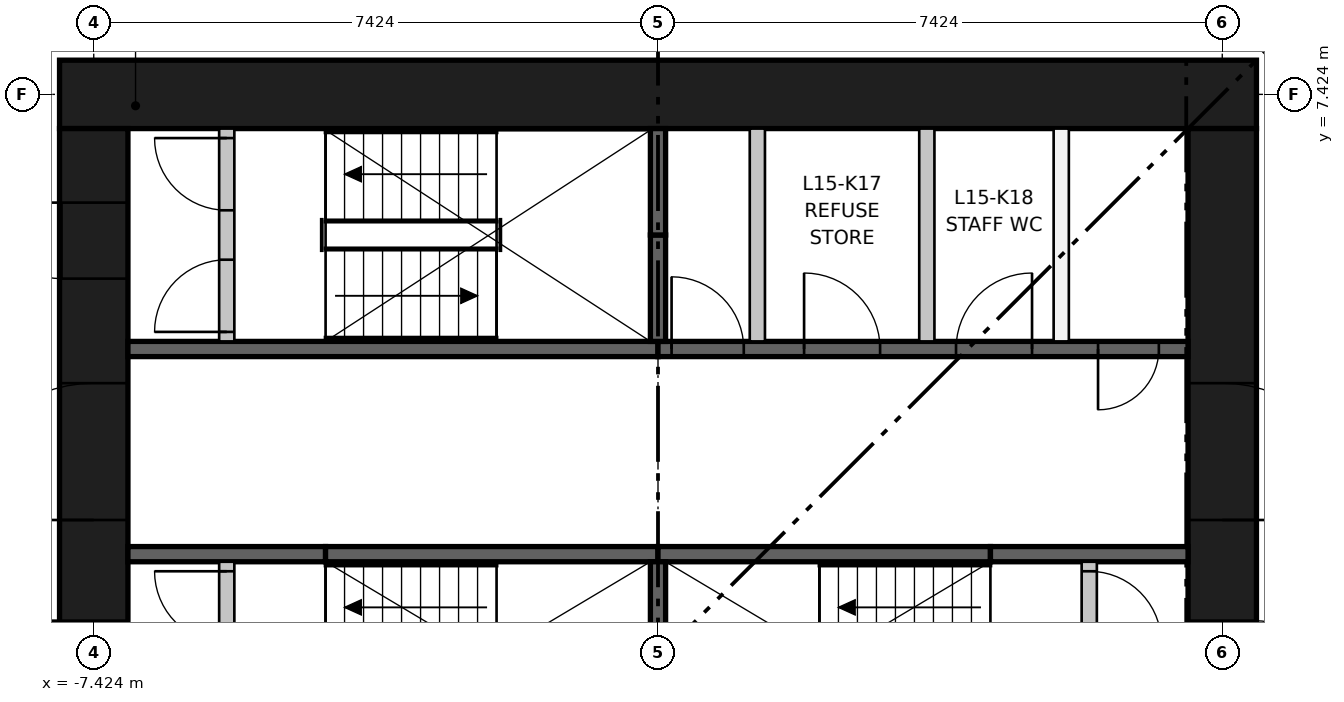
"""IFC4 building model, lengths in metres.
Left out: names, types, materials, properties, quantities, classifications, styles, units other than length and angle.
Written with IfcOpenShell. Run it as: python <this file> out.ifc"""

import sys

from ifc_helpers import new_model, si_unit, direction, frame, frame_2d, origin, place, context, subcontext, project, spatial, rectangle, extrude, element, fill, save


model = new_model("IFC4")
c1 = context("Model", 3, precision=1e-05, world=origin(), true_north=direction((0.0, 1.0)))
c2 = subcontext(c1, "Body", "Model", "MODEL_VIEW")
j1 = project(units=[si_unit("LENGTHUNIT", "METRE"), si_unit("PLANEANGLEUNIT", "RADIAN")], contexts=[c1])
p1 = place(None, origin())
s1 = spatial("IfcSite", under=j1, at=p1, CompositionType="ELEMENT")
p2 = place(p1, origin())
s2 = spatial("IfcBuilding", under=s1, at=p2, CompositionType="ELEMENT")
p3 = place(p2, frame((0.0, 0.0, 59.05)))
s3 = spatial("IfcBuildingStorey", under=s2, at=p3, CompositionType="ELEMENT", Elevation=59.05)
p4 = place(p3, frame((-7.874, 7.424, 0.0), z_axis=(0.0, 0.0, 1.0), x_axis=(1.0, 0.0, 0.0)))
e1 = element("IfcWall", 1, at=p4, inside=s3, PredefinedType="SHEAR", context=c2, shape_type="SweptSolid", body=[
    extrude(rectangle(XDim=15.748, YDim=0.9, at=frame_2d((7.874, 0.0))), origin(), (0.0, 0.0, 1.0), 3.65),
])
p5 = place(p3, frame((-7.424, -6.974, 0.0), z_axis=(0.0, 0.0, 1.0), x_axis=(0.0, 1.0, 0.0)))
e2 = element("IfcWall", 2, at=p5, inside=s3, PredefinedType="SHEAR", context=c2, shape_type="SweptSolid", body=[
    extrude(rectangle(XDim=13.948, YDim=0.9, at=frame_2d((6.974, 0.0))), origin(), (0.0, 0.0, 1.0), 3.65),
])
p6 = place(p5, frame((6.474, 0.0, 0.0)))
e3 = element("IfcOpeningElement", 3, at=p6, cuts=e2, PredefinedType="OPENING", context=c2, shape_type="SweptSolid", body=[
    extrude(rectangle(XDim=1.0, YDim=2.1, at=frame_2d((0.5, 1.05))), frame((0.0, 0.46, 0.0), z_axis=(0.0, -1.0, 0.0), x_axis=(1.0, 0.0, 0.0)), (0.0, 0.0, 1.0), 0.92),
])
p7 = place(p5, frame((3.35, 0.0, 0.0)))
e4 = element("IfcOpeningElement", 4, at=p7, cuts=e2, PredefinedType="OPENING", context=c2, shape_type="SweptSolid", body=[
    extrude(rectangle(XDim=1.8, YDim=2.1, at=frame_2d((0.9, 1.05))), frame((0.0, 0.46, 0.0), z_axis=(0.0, -1.0, 0.0), x_axis=(1.0, 0.0, 0.0)), (0.0, 0.0, 1.0), 0.92),
])
p8 = place(p5, frame((8.799, 0.0, 0.0)))
e5 = element("IfcOpeningElement", 5, at=p8, cuts=e2, PredefinedType="OPENING", context=c2, shape_type="SweptSolid", body=[
    extrude(rectangle(XDim=1.8, YDim=2.1, at=frame_2d((0.9, 1.05))), frame((0.0, 0.46, 0.0), z_axis=(0.0, -1.0, 0.0), x_axis=(1.0, 0.0, 0.0)), (0.0, 0.0, 1.0), 0.92),
])
p9 = place(p5, frame((11.974, 0.0, 0.0)))
e6 = element("IfcOpeningElement", 6, at=p9, cuts=e2, PredefinedType="OPENING", context=c2, shape_type="SweptSolid", body=[
    extrude(rectangle(XDim=1.0, YDim=2.1, at=frame_2d((0.5, 1.05))), frame((0.0, 0.46, 0.0), z_axis=(0.0, -1.0, 0.0), x_axis=(1.0, 0.0, 0.0)), (0.0, 0.0, 1.0), 0.92),
])
p10 = place(p3, frame((7.424, -6.974, 0.0), z_axis=(0.0, 0.0, 1.0), x_axis=(0.0, 1.0, 0.0)))
e7 = element("IfcWall", 7, at=p10, inside=s3, PredefinedType="SHEAR", context=c2, shape_type="SweptSolid", body=[
    extrude(rectangle(XDim=13.948, YDim=0.9, at=frame_2d((6.974, 0.0))), origin(), (0.0, 0.0, 1.0), 3.65),
])
p11 = place(p10, frame((6.474, 0.0, 0.0)))
e8 = element("IfcOpeningElement", 8, at=p11, cuts=e7, PredefinedType="OPENING", context=c2, shape_type="SweptSolid", body=[
    extrude(rectangle(XDim=1.0, YDim=2.1, at=frame_2d((0.5, 1.05))), frame((0.0, 0.46, 0.0), z_axis=(0.0, -1.0, 0.0), x_axis=(1.0, 0.0, 0.0)), (0.0, 0.0, 1.0), 0.92),
])
p12 = place(p10, frame((3.35, 0.0, 0.0)))
e9 = element("IfcOpeningElement", 9, at=p12, cuts=e7, PredefinedType="OPENING", context=c2, shape_type="SweptSolid", body=[
    extrude(rectangle(XDim=1.8, YDim=2.1, at=frame_2d((0.9, 1.05))), frame((0.0, 0.46, 0.0), z_axis=(0.0, -1.0, 0.0), x_axis=(1.0, 0.0, 0.0)), (0.0, 0.0, 1.0), 0.92),
])
p13 = place(p10, frame((8.799, 0.0, 0.0)))
e10 = element("IfcOpeningElement", 10, at=p13, cuts=e7, PredefinedType="OPENING", context=c2, shape_type="SweptSolid", body=[
    extrude(rectangle(XDim=1.8, YDim=2.1, at=frame_2d((0.9, 1.05))), frame((0.0, 0.46, 0.0), z_axis=(0.0, -1.0, 0.0), x_axis=(1.0, 0.0, 0.0)), (0.0, 0.0, 1.0), 0.92),
])
p14 = place(p3, frame((-6.974, 4.074, 0.0), z_axis=(0.0, 0.0, 1.0), x_axis=(1.0, 0.0, 0.0)))
e11 = element("IfcWall", 11, at=p14, inside=s3, PredefinedType="SHEAR", context=c2, shape_type="SweptSolid", body=[
    extrude(rectangle(XDim=6.974, YDim=0.2, at=frame_2d((3.487, 0.0))), origin(), (0.0, 0.0, 1.0), 3.3),
])
p15 = place(p3, frame((0.0, 4.074, 0.0), z_axis=(0.0, 0.0, 1.0), x_axis=(1.0, 0.0, 0.0)))
e12 = element("IfcWall", 12, at=p15, inside=s3, PredefinedType="SHEAR", context=c2, shape_type="SweptSolid", body=[
    extrude(rectangle(XDim=6.974, YDim=0.2, at=frame_2d((3.487, 0.0))), origin(), (0.0, 0.0, 1.0), 3.3),
])
p16 = place(p15, frame((0.179, 0.0, 0.0)))
e13 = element("IfcOpeningElement", 13, at=p16, cuts=e12, PredefinedType="OPENING", context=c2, shape_type="SweptSolid", body=[
    extrude(rectangle(XDim=0.95, YDim=2.1, at=frame_2d((0.475, 1.05))), frame((0.0, 0.11, 0.0), z_axis=(0.0, -1.0, 0.0), x_axis=(1.0, 0.0, 0.0)), (0.0, 0.0, 1.0), 0.22),
])
p17 = place(p15, frame((1.922, 0.0, 0.0)))
e14 = element("IfcOpeningElement", 14, at=p17, cuts=e12, PredefinedType="OPENING", context=c2, shape_type="SweptSolid", body=[
    extrude(rectangle(XDim=1.0, YDim=2.1, at=frame_2d((0.5, 1.05))), frame((0.0, 0.11, 0.0), z_axis=(0.0, -1.0, 0.0), x_axis=(1.0, 0.0, 0.0)), (0.0, 0.0, 1.0), 0.22),
])
p18 = place(p15, frame((3.921, 0.0, 0.0)))
e15 = element("IfcOpeningElement", 15, at=p18, cuts=e12, PredefinedType="OPENING", context=c2, shape_type="SweptSolid", body=[
    extrude(rectangle(XDim=1.0, YDim=2.1, at=frame_2d((0.5, 1.05))), frame((0.0, 0.11, 0.0), z_axis=(0.0, -1.0, 0.0), x_axis=(1.0, 0.0, 0.0)), (0.0, 0.0, 1.0), 0.22),
])
p19 = place(p15, frame((5.79, 0.0, 0.0)))
e16 = element("IfcOpeningElement", 16, at=p19, cuts=e12, PredefinedType="OPENING", context=c2, shape_type="SweptSolid", body=[
    extrude(rectangle(XDim=0.8, YDim=2.1, at=frame_2d((0.4, 1.05))), frame((0.0, 0.11, 0.0), z_axis=(0.0, -1.0, 0.0), x_axis=(1.0, 0.0, 0.0)), (0.0, 0.0, 1.0), 0.22),
])
p20 = place(p3, frame((-6.974, 1.375, 0.0), z_axis=(0.0, 0.0, 1.0), x_axis=(1.0, 0.0, 0.0)))
e17 = element("IfcWall", 17, at=p20, inside=s3, PredefinedType="SHEAR", context=c2, shape_type="SweptSolid", body=[
    extrude(rectangle(XDim=2.6, YDim=0.2, at=frame_2d((1.3, 0.0))), origin(), (0.0, 0.0, 1.0), 3.3),
])
for number, where, z_axis, x_axis in (
    (18, (-4.374, 1.375, 0.0), (0.0, 0.0, 1.0), (1.0, 0.0, 0.0)),
    (19, (0.0, 1.375, 0.0), (0.0, 0.0, 1.0), (1.0, 0.0, 0.0)),
):
    element("IfcWall", number, at=place(p3, frame(where, z_axis=z_axis, x_axis=x_axis)), inside=s3, PredefinedType="SHEAR", context=c2, shape_type="SweptSolid", body=[
        extrude(rectangle(XDim=4.374, YDim=0.2, at=frame_2d((2.187, 0.0))), origin(), (0.0, 0.0, 1.0), 3.3),
    ])
p21 = place(p3, frame((4.374, 1.375, 0.0), z_axis=(0.0, 0.0, 1.0), x_axis=(1.0, 0.0, 0.0)))
e20 = element("IfcWall", 20, at=p21, inside=s3, PredefinedType="SHEAR", context=c2, shape_type="SweptSolid", body=[
    extrude(rectangle(XDim=2.6, YDim=0.2, at=frame_2d((1.3, 0.0))), origin(), (0.0, 0.0, 1.0), 3.3),
])
p22 = place(p3, frame((0.0, -1.275, 0.0), z_axis=(0.0, 0.0, 1.0), x_axis=(0.0, 1.0, 0.0)))
e21 = element("IfcWall", 21, at=p22, inside=s3, PredefinedType="SHEAR", context=c2, shape_type="SweptSolid", body=[
    extrude(rectangle(XDim=2.55, YDim=0.2, at=frame_2d((1.275, 0.0))), origin(), (0.0, 0.0, 1.0), 3.3),
])
p23 = place(p3, frame((0.0, 4.174, 0.0), z_axis=(0.0, 0.0, 1.0), x_axis=(0.0, 1.0, 0.0)))
e22 = element("IfcWall", 22, at=p23, inside=s3, PredefinedType="SHEAR", context=c2, shape_type="SweptSolid", body=[
    extrude(rectangle(XDim=1.4, YDim=0.2, at=frame_2d((0.7, 0.0))), origin(), (0.0, 0.0, 1.0), 3.3),
])
p24 = place(p3, frame((0.0, 5.574, 0.0), z_axis=(0.0, 0.0, 1.0), x_axis=(0.0, 1.0, 0.0)))
e23 = element("IfcWall", 23, at=p24, inside=s3, PredefinedType="SHEAR", context=c2, shape_type="SweptSolid", body=[
    extrude(rectangle(XDim=1.4, YDim=0.2, at=frame_2d((0.7, 0.0))), origin(), (0.0, 0.0, 1.0), 3.3),
])
for number, where, z_axis, x_axis in (
    (24, (1.307, 4.174, 0.0), (0.0, 0.0, 1.0), (0.0, 1.0, 0.0)),
    (25, (3.537, 4.174, 0.0), (0.0, 0.0, 1.0), (0.0, 1.0, 0.0)),
    (26, (5.305, 4.174, 0.0), (0.0, 0.0, 1.0), (0.0, 1.0, 0.0)),
):
    element("IfcWall", number, at=place(p3, frame(where, z_axis=z_axis, x_axis=x_axis)), inside=s3, PredefinedType="PARTITIONING", context=c2, shape_type="SweptSolid", body=[
        extrude(rectangle(XDim=2.8, YDim=0.2, at=frame_2d((1.4, 0.0))), origin(), (0.0, 0.0, 1.0), 3.3),
    ])
p25 = place(p3, frame((-5.674, -1.275, 0.0), z_axis=(0.0, 0.0, 1.0), x_axis=(0.0, 1.0, 0.0)))
e27 = element("IfcWall", 27, at=p25, inside=s3, PredefinedType="PARTITIONING", context=c2, shape_type="SweptSolid", body=[
    extrude(rectangle(XDim=2.55, YDim=0.2, at=frame_2d((1.275, 0.0))), origin(), (0.0, 0.0, 1.0), 3.3),
])
p26 = place(p25, frame((0.125, 0.0, 0.0)))
e28 = element("IfcOpeningElement", 28, at=p26, cuts=e27, PredefinedType="OPENING", context=c2, shape_type="SweptSolid", body=[
    extrude(rectangle(XDim=0.95, YDim=2.1, at=frame_2d((0.475, 1.05))), frame((0.0, 0.11, 0.0), z_axis=(0.0, -1.0, 0.0), x_axis=(1.0, 0.0, 0.0)), (0.0, 0.0, 1.0), 0.22),
])
p27 = place(p25, frame((1.475, 0.0, 0.0)))
e29 = element("IfcOpeningElement", 29, at=p27, cuts=e27, PredefinedType="OPENING", context=c2, shape_type="SweptSolid", body=[
    extrude(rectangle(XDim=0.95, YDim=2.1, at=frame_2d((0.475, 1.05))), frame((0.0, 0.11, 0.0), z_axis=(0.0, -1.0, 0.0), x_axis=(1.0, 0.0, 0.0)), (0.0, 0.0, 1.0), 0.22),
])
p28 = place(p3, frame((5.674, -1.275, 0.0), z_axis=(0.0, 0.0, 1.0), x_axis=(0.0, 1.0, 0.0)))
e30 = element("IfcWall", 30, at=p28, inside=s3, PredefinedType="PARTITIONING", context=c2, shape_type="SweptSolid", body=[
    extrude(rectangle(XDim=2.55, YDim=0.2, at=frame_2d((1.275, 0.0))), origin(), (0.0, 0.0, 1.0), 3.3),
])
p29 = place(p28, frame((0.125, 0.0, 0.0)))
e31 = element("IfcOpeningElement", 31, at=p29, cuts=e30, PredefinedType="OPENING", context=c2, shape_type="SweptSolid", body=[
    extrude(rectangle(XDim=0.95, YDim=2.1, at=frame_2d((0.475, 1.05))), frame((0.0, 0.11, 0.0), z_axis=(0.0, -1.0, 0.0), x_axis=(1.0, 0.0, 0.0)), (0.0, 0.0, 1.0), 0.22),
])
p30 = place(p28, frame((1.475, 0.0, 0.0)))
e32 = element("IfcOpeningElement", 32, at=p30, cuts=e30, PredefinedType="OPENING", context=c2, shape_type="SweptSolid", body=[
    extrude(rectangle(XDim=0.95, YDim=2.1, at=frame_2d((0.475, 1.05))), frame((0.0, 0.11, 0.0), z_axis=(0.0, -1.0, 0.0), x_axis=(1.0, 0.0, 0.0)), (0.0, 0.0, 1.0), 0.22),
])
p31 = place(p3, frame((-5.674, 4.174, 0.0), z_axis=(0.0, 0.0, 1.0), x_axis=(0.0, 1.0, 0.0)))
e33 = element("IfcWall", 33, at=p31, inside=s3, PredefinedType="PARTITIONING", context=c2, shape_type="SweptSolid", body=[
    extrude(rectangle(XDim=2.8, YDim=0.2, at=frame_2d((1.4, 0.0))), origin(), (0.0, 0.0, 1.0), 3.3),
])
p32 = place(p31, frame((0.125, 0.0, 0.0)))
e34 = element("IfcOpeningElement", 34, at=p32, cuts=e33, PredefinedType="OPENING", context=c2, shape_type="SweptSolid", body=[
    extrude(rectangle(XDim=0.95, YDim=2.1, at=frame_2d((0.475, 1.05))), frame((0.0, 0.11, 0.0), z_axis=(0.0, -1.0, 0.0), x_axis=(1.0, 0.0, 0.0)), (0.0, 0.0, 1.0), 0.22),
])
p33 = place(p31, frame((1.725, 0.0, 0.0)))
e35 = element("IfcOpeningElement", 35, at=p33, cuts=e33, PredefinedType="OPENING", context=c2, shape_type="SweptSolid", body=[
    extrude(rectangle(XDim=0.95, YDim=2.1, at=frame_2d((0.475, 1.05))), frame((0.0, 0.11, 0.0), z_axis=(0.0, -1.0, 0.0), x_axis=(1.0, 0.0, 0.0)), (0.0, 0.0, 1.0), 0.22),
])
p34 = place(p27, origin())
e36 = element("IfcDoor", 36, at=p34, inside=s3, OperationType="SINGLE_SWING_RIGHT", PredefinedType="DOOR", context=c2, shape_type="SweptSolid", body=[
    extrude(rectangle(XDim=0.95, YDim=2.1, at=frame_2d((0.475, 1.05))), frame((0.0, 0.025, 0.0), z_axis=(0.0, -1.0, 0.0), x_axis=(1.0, 0.0, 0.0)), (0.0, 0.0, 1.0), 0.05),
])
fill(e29, e36)
p35 = place(p30, frame((0.95, 0.0, 0.0), z_axis=(0.0, 0.0, 1.0), x_axis=(-1.0, 0.0, 0.0)))
e37 = element("IfcDoor", 37, at=p35, inside=s3, OperationType="SINGLE_SWING_LEFT", PredefinedType="DOOR", context=c2, shape_type="SweptSolid", body=[
    extrude(rectangle(XDim=0.95, YDim=2.1, at=frame_2d((0.475, 1.05))), frame((0.0, 0.025, 0.0), z_axis=(0.0, -1.0, 0.0), x_axis=(1.0, 0.0, 0.0)), (0.0, 0.0, 1.0), 0.05),
])
fill(e32, e37)
p36 = place(p32, origin())
e38 = element("IfcDoor", 38, at=p36, inside=s3, OperationType="SINGLE_SWING_LEFT", PredefinedType="DOOR", context=c2, shape_type="SweptSolid", body=[
    extrude(rectangle(XDim=0.95, YDim=2.1, at=frame_2d((0.475, 1.05))), frame((0.0, 0.025, 0.0), z_axis=(0.0, -1.0, 0.0), x_axis=(1.0, 0.0, 0.0)), (0.0, 0.0, 1.0), 0.05),
])
fill(e34, e38)
p37 = place(p33, origin())
e39 = element("IfcDoor", 39, at=p37, inside=s3, OperationType="SINGLE_SWING_RIGHT", PredefinedType="DOOR", context=c2, shape_type="SweptSolid", body=[
    extrude(rectangle(XDim=0.95, YDim=2.1, at=frame_2d((0.475, 1.05))), frame((0.0, 0.025, 0.0), z_axis=(0.0, -1.0, 0.0), x_axis=(1.0, 0.0, 0.0)), (0.0, 0.0, 1.0), 0.05),
])
fill(e35, e39)
p38 = place(p16, origin())
e40 = element("IfcDoor", 40, at=p38, inside=s3, OperationType="SINGLE_SWING_LEFT", PredefinedType="DOOR", context=c2, shape_type="SweptSolid", body=[
    extrude(rectangle(XDim=0.95, YDim=2.1, at=frame_2d((0.475, 1.05))), frame((0.0, 0.025, 0.0), z_axis=(0.0, -1.0, 0.0), x_axis=(1.0, 0.0, 0.0)), (0.0, 0.0, 1.0), 0.05),
])
fill(e13, e40)
p39 = place(p17, origin())
e41 = element("IfcDoor", 41, at=p39, inside=s3, OperationType="SINGLE_SWING_LEFT", PredefinedType="DOOR", context=c2, shape_type="SweptSolid", body=[
    extrude(rectangle(XDim=1.0, YDim=2.1, at=frame_2d((0.5, 1.05))), frame((0.0, 0.025, 0.0), z_axis=(0.0, -1.0, 0.0), x_axis=(1.0, 0.0, 0.0)), (0.0, 0.0, 1.0), 0.05),
])
fill(e14, e41)
p40 = place(p18, origin())
e42 = element("IfcDoor", 42, at=p40, inside=s3, OperationType="SINGLE_SWING_RIGHT", PredefinedType="DOOR", context=c2, shape_type="SweptSolid", body=[
    extrude(rectangle(XDim=1.0, YDim=2.1, at=frame_2d((0.5, 1.05))), frame((0.0, 0.025, 0.0), z_axis=(0.0, -1.0, 0.0), x_axis=(1.0, 0.0, 0.0)), (0.0, 0.0, 1.0), 0.05),
])
fill(e15, e42)
p41 = place(p19, frame((0.8, 0.0, 0.0), z_axis=(0.0, 0.0, 1.0), x_axis=(-1.0, 0.0, 0.0)))
e43 = element("IfcDoor", 43, at=p41, inside=s3, OperationType="SINGLE_SWING_LEFT", PredefinedType="DOOR", context=c2, shape_type="SweptSolid", body=[
    extrude(rectangle(XDim=0.8, YDim=2.1, at=frame_2d((0.4, 1.05))), frame((0.0, 0.025, 0.0), z_axis=(0.0, -1.0, 0.0), x_axis=(1.0, 0.0, 0.0)), (0.0, 0.0, 1.0), 0.05),
])
fill(e16, e43)
p42 = place(p6, origin())
e44 = element("IfcDoor", 44, at=p42, inside=s3, OperationType="SINGLE_SWING_RIGHT", PredefinedType="DOOR", context=c2, shape_type="SweptSolid", body=[
    extrude(rectangle(XDim=1.0, YDim=2.1, at=frame_2d((0.5, 1.05))), frame((0.0, 0.45, 0.0), z_axis=(0.0, -1.0, 0.0), x_axis=(1.0, 0.0, 0.0)), (0.0, 0.0, 1.0), 0.05),
])
fill(e3, e44)
p43 = place(p8, origin())
e45 = element("IfcDoor", 45, at=p43, inside=s3, OperationType="DOUBLE_DOOR_SINGLE_SWING", PredefinedType="DOOR", context=c2, shape_type="SweptSolid", body=[
    extrude(rectangle(XDim=1.8, YDim=2.1, at=frame_2d((0.9, 1.05))), frame((0.0, 0.025, 0.0), z_axis=(0.0, -1.0, 0.0), x_axis=(1.0, 0.0, 0.0)), (0.0, 0.0, 1.0), 0.05),
])
fill(e5, e45)
p44 = place(p9, origin())
e46 = element("IfcDoor", 46, at=p44, inside=s3, OperationType="SINGLE_SWING_RIGHT", PredefinedType="DOOR", context=c2, shape_type="SweptSolid", body=[
    extrude(rectangle(XDim=1.0, YDim=2.1, at=frame_2d((0.5, 1.05))), frame((0.0, 0.45, 0.0), z_axis=(0.0, -1.0, 0.0), x_axis=(1.0, 0.0, 0.0)), (0.0, 0.0, 1.0), 0.05),
])
fill(e6, e46)
p45 = place(p11, frame((1.0, 0.0, 0.0), z_axis=(0.0, 0.0, 1.0), x_axis=(-1.0, 0.0, 0.0)))
e47 = element("IfcDoor", 47, at=p45, inside=s3, OperationType="SINGLE_SWING_LEFT", PredefinedType="DOOR", context=c2, shape_type="SweptSolid", body=[
    extrude(rectangle(XDim=1.0, YDim=2.1, at=frame_2d((0.5, 1.05))), frame((0.0, 0.45, 0.0), z_axis=(0.0, -1.0, 0.0), x_axis=(1.0, 0.0, 0.0)), (0.0, 0.0, 1.0), 0.05),
])
fill(e8, e47)
p46 = place(p13, frame((1.8, 0.0, 0.0), z_axis=(0.0, 0.0, 1.0), x_axis=(-1.0, 0.0, 0.0)))
e48 = element("IfcDoor", 48, at=p46, inside=s3, OperationType="DOUBLE_DOOR_SINGLE_SWING", PredefinedType="DOOR", context=c2, shape_type="SweptSolid", body=[
    extrude(rectangle(XDim=1.8, YDim=2.1, at=frame_2d((0.9, 1.05))), frame((0.0, 0.025, 0.0), z_axis=(0.0, -1.0, 0.0), x_axis=(1.0, 0.0, 0.0)), (0.0, 0.0, 1.0), 0.05),
])
fill(e10, e48)
save(model, sys.argv[1])
